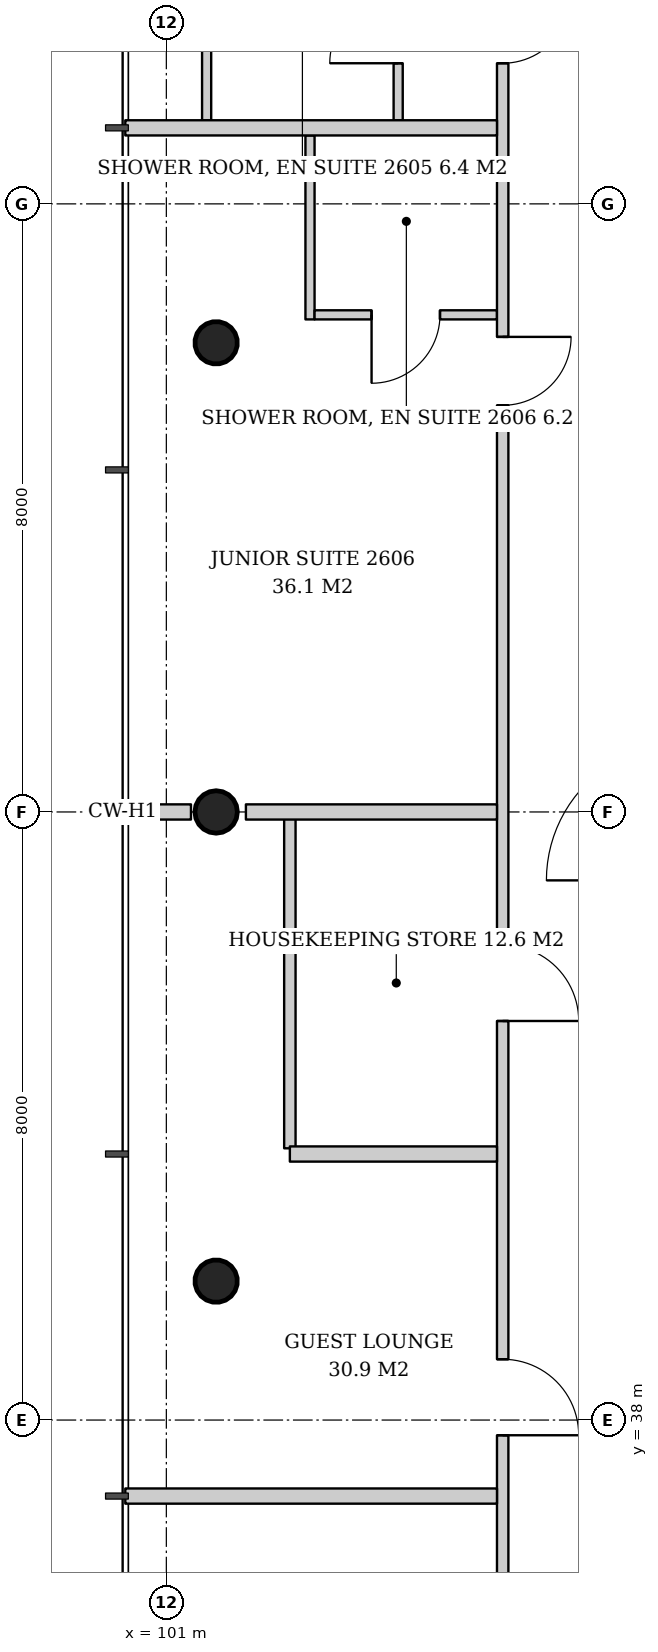
"""IFC4 building model, lengths in metres.
Left out: names, types, materials, properties, quantities, classifications, styles, units other than length and angle.
Written with IfcOpenShell. Run it as: python <this file> out.ifc"""

import sys

from ifc_helpers import new_model, si_unit, direction, frame, frame_2d, origin, origin_2d, place, context, subcontext, project, spatial, rectangle, hollow_circle, extrude, element, fill, save


model = new_model("IFC4")
c1 = context("Model", 3, precision=1e-05, world=origin(), true_north=direction((0.0, 1.0)))
c2 = subcontext(c1, "Body", "Model", "MODEL_VIEW")
j1 = project(units=[si_unit("LENGTHUNIT", "METRE"), si_unit("PLANEANGLEUNIT", "RADIAN")], contexts=[c1])
p1 = place(None, origin())
s1 = spatial("IfcSite", under=j1, at=p1, CompositionType="ELEMENT")
p2 = place(p1, origin())
s2 = spatial("IfcBuilding", under=s1, at=p2, CompositionType="ELEMENT")
p3 = place(p2, frame((0.0, 0.0, 104.6)))
s3 = spatial("IfcBuildingStorey", under=s2, at=p3, CompositionType="ELEMENT", Elevation=104.6)
p4 = place(p3, frame((101.604, 52.198, 0.0), z_axis=(0.04306234503, -0.02149908433, 0.998841040313), x_axis=(0.446680166538, 0.894693706707, 0.0)))
e1 = element("IfcColumn", 1, at=p4, inside=s3, PredefinedType="COLUMN", context=c2, shape_type="SweptSolid", body=[
    extrude(hollow_circle(Radius=0.28, WallThickness=0.02, at=origin_2d()), origin(), (0.0, 0.0, 1.0), 3.804),
])
p5 = place(p3, frame((101.604, 46.0, 0.0), z_axis=(0.043072300418, 0.0, 0.999071957837), x_axis=(0.0, 1.0, 0.0)))
e2 = element("IfcColumn", 2, at=p5, inside=s3, PredefinedType="COLUMN", context=c2, shape_type="SweptSolid", body=[
    extrude(hollow_circle(Radius=0.28, WallThickness=0.02, at=origin_2d()), origin(), (0.0, 0.0, 1.0), 3.803),
])
p6 = place(p3, frame((101.604, 39.802, 0.0), z_axis=(0.04306234503, 0.02149908433, 0.998841040313), x_axis=(-0.446680166538, 0.894693706707, 0.0)))
e3 = element("IfcColumn", 3, at=p6, inside=s3, PredefinedType="COLUMN", context=c2, shape_type="SweptSolid", body=[
    extrude(hollow_circle(Radius=0.28, WallThickness=0.02, at=origin_2d()), origin(), (0.0, 0.0, 1.0), 3.804),
])
p7 = place(p3, frame((104.05, 55.1, 0.0), z_axis=(0.0, 0.0, 1.0), x_axis=(0.0, 1.0, 0.0)))
e4 = element("IfcWall", 4, at=p7, inside=s3, PredefinedType="PARTITIONING", context=c2, shape_type="SweptSolid", body=[
    extrude(rectangle(XDim=2.58, YDim=0.12, at=frame_2d((1.29, 0.0))), origin(), (0.0, 0.0, 1.0), 2.9),
])
p8 = place(p7, frame((0.75, 0.0, 0.0)))
e5 = element("IfcOpeningElement", 5, at=p8, cuts=e4, PredefinedType="OPENING", context=c2, shape_type="SweptSolid", body=[
    extrude(rectangle(XDim=0.9, YDim=2.1, at=frame_2d((0.45, 1.05))), frame((0.0, 0.07, 0.0), z_axis=(0.0, -1.0, 0.0), x_axis=(1.0, 0.0, 0.0)), (0.0, 0.0, 1.0), 0.14),
])
p9 = place(p3, frame((101.53, 55.1, 0.0), z_axis=(0.0, 0.0, 1.0), x_axis=(0.0, 1.0, 0.0)))
e6 = element("IfcWall", 6, at=p9, inside=s3, PredefinedType="PARTITIONING", context=c2, shape_type="SweptSolid", body=[
    extrude(rectangle(XDim=2.81, YDim=0.12, at=frame_2d((1.405, 0.0))), origin(), (0.0, 0.0, 1.0), 3.6),
])
p10 = place(p3, frame((102.89, 54.9, 0.0), z_axis=(0.0, 0.0, 1.0), x_axis=(0.0, -1.0, 0.0)))
e7 = element("IfcWall", 7, at=p10, inside=s3, PredefinedType="PARTITIONING", context=c2, shape_type="SweptSolid", body=[
    extrude(rectangle(XDim=2.42, YDim=0.12, at=frame_2d((1.21, 0.0))), origin(), (0.0, 0.0, 1.0), 3.6),
])
p11 = place(p3, frame((105.35, 52.54, 0.0), z_axis=(0.0, 0.0, 1.0), x_axis=(-1.0, 0.0, 0.0)))
e8 = element("IfcWall", 8, at=p11, inside=s3, PredefinedType="PARTITIONING", context=c2, shape_type="SweptSolid", body=[
    extrude(rectangle(XDim=2.4, YDim=0.12, at=frame_2d((1.2, 0.0))), origin(), (0.0, 0.0, 1.0), 3.6),
])
p12 = place(p11, frame((0.75, 0.0, 0.0)))
e9 = element("IfcOpeningElement", 9, at=p12, cuts=e8, PredefinedType="OPENING", context=c2, shape_type="SweptSolid", body=[
    extrude(rectangle(XDim=0.9, YDim=2.1, at=frame_2d((0.45, 1.05))), frame((0.0, 0.07, 0.0), z_axis=(0.0, -1.0, 0.0), x_axis=(1.0, 0.0, 0.0)), (0.0, 0.0, 1.0), 0.14),
])
p13 = place(p3, frame((102.625, 45.925, 0.0), z_axis=(0.0, 0.0, 1.0), x_axis=(0.0, -1.0, 0.0)))
e10 = element("IfcWall", 10, at=p13, inside=s3, PredefinedType="PARTITIONING", context=c2, shape_type="SweptSolid", body=[
    extrude(rectangle(XDim=4.35, YDim=0.15, at=frame_2d((2.175, 0.0))), origin(), (0.0, 0.0, 1.0), 3.0),
])
p14 = place(p3, frame((105.425, 57.108, 0.0), z_axis=(0.0, 0.0, 1.0), x_axis=(0.0, -1.0, 0.0)))
e11 = element("IfcWall", 11, at=p14, inside=s3, PredefinedType="PARTITIONING", context=c2, shape_type="SweptSolid", body=[
    extrude(rectangle(XDim=22.217, YDim=0.15, at=frame_2d((11.108, 0.0))), origin(), (0.0, 0.0, 1.0), 2.9),
])
p15 = place(p14, frame((0.358, 0.0, 0.0)))
e12 = element("IfcOpeningElement", 12, at=p15, cuts=e11, PredefinedType="OPENING", context=c2, shape_type="SweptSolid", body=[
    extrude(rectangle(XDim=0.9, YDim=2.1, at=frame_2d((0.45, 1.05))), frame((0.0, 0.085, 0.0), z_axis=(0.0, -1.0, 0.0), x_axis=(1.0, 0.0, 0.0)), (0.0, 0.0, 1.0), 0.17),
])
p16 = place(p14, frame((4.858, 0.0, 0.0)))
e13 = element("IfcOpeningElement", 13, at=p16, cuts=e11, PredefinedType="OPENING", context=c2, shape_type="SweptSolid", body=[
    extrude(rectangle(XDim=0.9, YDim=2.1, at=frame_2d((0.45, 1.05))), frame((0.0, 0.085, 0.0), z_axis=(0.0, -1.0, 0.0), x_axis=(1.0, 0.0, 0.0)), (0.0, 0.0, 1.0), 0.17),
])
p17 = place(p14, frame((12.858, 0.0, 0.0)))
e14 = element("IfcOpeningElement", 14, at=p17, cuts=e11, PredefinedType="OPENING", context=c2, shape_type="SweptSolid", body=[
    extrude(rectangle(XDim=1.0, YDim=2.1, at=frame_2d((0.5, 1.05))), frame((0.0, 0.085, 0.0), z_axis=(0.0, -1.0, 0.0), x_axis=(1.0, 0.0, 0.0)), (0.0, 0.0, 1.0), 0.17),
])
p18 = place(p14, frame((18.308, 0.0, 0.0)))
e15 = element("IfcOpeningElement", 15, at=p18, cuts=e11, PredefinedType="OPENING", context=c2, shape_type="SweptSolid", body=[
    extrude(rectangle(XDim=1.0, YDim=2.1, at=frame_2d((0.5, 1.05))), frame((0.0, 0.085, 0.0), z_axis=(0.0, -1.0, 0.0), x_axis=(1.0, 0.0, 0.0)), (0.0, 0.0, 1.0), 0.17),
])
p19 = place(p3, frame((105.35, 55.0, 0.0), z_axis=(0.0, 0.0, 1.0), x_axis=(-1.0, 0.0, 0.0)))
e16 = element("IfcWall", 16, at=p19, inside=s3, PredefinedType="PARTITIONING", context=c2, shape_type="SweptSolid", body=[
    extrude(rectangle(XDim=4.89, YDim=0.2, at=frame_2d((2.445, 0.0))), origin(), (0.0, 0.0, 1.0), 2.9),
])
p20 = place(p3, frame((105.35, 46.0, 0.0), z_axis=(0.0, 0.0, 1.0), x_axis=(-1.0, 0.0, 0.0)))
e17 = element("IfcWall", 17, at=p20, inside=s3, PredefinedType="PARTITIONING", context=c2, shape_type="SweptSolid", body=[
    extrude(rectangle(XDim=3.303, YDim=0.2, at=frame_2d((1.652, 0.0))), origin(), (0.0, 0.0, 1.0), 3.6),
])
p21 = place(p3, frame((101.324, 46.0, 0.0), z_axis=(0.0, 0.0, 1.0), x_axis=(-1.0, 0.0, 0.0)))
e18 = element("IfcWall", 18, at=p21, inside=s3, PredefinedType="PARTITIONING", context=c2, shape_type="SweptSolid", body=[
    extrude(rectangle(XDim=0.864, YDim=0.2, at=frame_2d((0.432, 0.0))), origin(), (0.0, 0.0, 1.0), 3.6),
])
p22 = place(p3, frame((105.35, 41.5, 0.0), z_axis=(0.0, 0.0, 1.0), x_axis=(-1.0, 0.0, 0.0)))
e19 = element("IfcWall", 19, at=p22, inside=s3, PredefinedType="PARTITIONING", context=c2, shape_type="SweptSolid", body=[
    extrude(rectangle(XDim=2.725, YDim=0.2, at=frame_2d((1.363, 0.0))), origin(), (0.0, 0.0, 1.0), 3.6),
])
p23 = place(p3, frame((105.35, 37.0, 0.0), z_axis=(0.0, 0.0, 1.0), x_axis=(-1.0, 0.0, 0.0)))
e20 = element("IfcWall", 20, at=p23, inside=s3, PredefinedType="PARTITIONING", context=c2, shape_type="SweptSolid", body=[
    extrude(rectangle(XDim=4.89, YDim=0.2, at=frame_2d((2.445, 0.0))), origin(), (0.0, 0.0, 1.0), 3.2),
])
p24 = place(p8, origin())
e21 = element("IfcDoor", 21, at=p24, inside=s3, OperationType="SINGLE_SWING_LEFT", PredefinedType="DOOR", context=c2, shape_type="SweptSolid", body=[
    extrude(rectangle(XDim=0.9, YDim=2.1, at=frame_2d((0.45, 1.05))), frame((0.0, 0.025, 0.0), z_axis=(0.0, -1.0, 0.0), x_axis=(1.0, 0.0, 0.0)), (0.0, 0.0, 1.0), 0.05),
])
fill(e5, e21)
p25 = place(p12, origin())
e22 = element("IfcDoor", 22, at=p25, inside=s3, OperationType="SINGLE_SWING_RIGHT", PredefinedType="DOOR", context=c2, shape_type="SweptSolid", body=[
    extrude(rectangle(XDim=0.9, YDim=2.1, at=frame_2d((0.45, 1.05))), frame((0.0, 0.025, 0.0), z_axis=(0.0, -1.0, 0.0), x_axis=(1.0, 0.0, 0.0)), (0.0, 0.0, 1.0), 0.05),
])
fill(e9, e22)
p26 = place(p15, origin())
e23 = element("IfcDoor", 23, at=p26, inside=s3, OperationType="SINGLE_SWING_LEFT", PredefinedType="DOOR", context=c2, shape_type="SweptSolid", body=[
    extrude(rectangle(XDim=0.9, YDim=2.1, at=frame_2d((0.45, 1.05))), frame((0.0, 0.025, 0.0), z_axis=(0.0, -1.0, 0.0), x_axis=(1.0, 0.0, 0.0)), (0.0, 0.0, 1.0), 0.05),
])
fill(e12, e23)
p27 = place(p16, origin())
e24 = element("IfcDoor", 24, at=p27, inside=s3, OperationType="SINGLE_SWING_LEFT", PredefinedType="DOOR", context=c2, shape_type="SweptSolid", body=[
    extrude(rectangle(XDim=0.9, YDim=2.1, at=frame_2d((0.45, 1.05))), frame((0.0, 0.025, 0.0), z_axis=(0.0, -1.0, 0.0), x_axis=(1.0, 0.0, 0.0)), (0.0, 0.0, 1.0), 0.05),
])
fill(e13, e24)
p28 = place(p17, origin())
e25 = element("IfcDoor", 25, at=p28, inside=s3, OperationType="SINGLE_SWING_RIGHT", PredefinedType="DOOR", context=c2, shape_type="SweptSolid", body=[
    extrude(rectangle(XDim=1.0, YDim=2.1, at=frame_2d((0.5, 1.05))), frame((0.0, 0.025, 0.0), z_axis=(0.0, -1.0, 0.0), x_axis=(1.0, 0.0, 0.0)), (0.0, 0.0, 1.0), 0.05),
])
fill(e14, e25)
p29 = place(p18, origin())
e26 = element("IfcDoor", 26, at=p29, inside=s3, OperationType="SINGLE_SWING_RIGHT", PredefinedType="DOOR", context=c2, shape_type="SweptSolid", body=[
    extrude(rectangle(XDim=1.0, YDim=2.1, at=frame_2d((0.5, 1.05))), frame((0.0, 0.025, 0.0), z_axis=(0.0, -1.0, 0.0), x_axis=(1.0, 0.0, 0.0)), (0.0, 0.0, 1.0), 0.05),
])
fill(e15, e26)
save(model, sys.argv[1])
